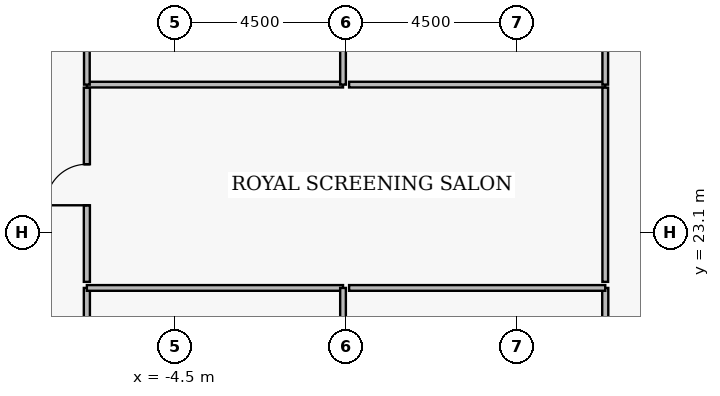
"""IFC4 building model, lengths in metres.
Left out: names, types, materials, properties, quantities, classifications, styles, units other than length and angle.
Written with IfcOpenShell. Run it as: python <this file> out.ifc"""

import sys

from ifc_helpers import new_model, si_unit, direction, frame, frame_2d, origin, place, context, subcontext, project, spatial, rectangle, extrude, element, fill, save


model = new_model("IFC4")
c1 = context("Model", 3, precision=1e-05, world=origin(), true_north=direction((0.0, 1.0)))
c2 = subcontext(c1, "Body", "Model", "MODEL_VIEW")
j1 = project(units=[si_unit("LENGTHUNIT", "METRE"), si_unit("PLANEANGLEUNIT", "RADIAN")], contexts=[c1])
p1 = place(None, origin())
s1 = spatial("IfcSite", under=j1, at=p1, CompositionType="ELEMENT")
p2 = place(p1, origin())
s2 = spatial("IfcBuilding", under=s1, at=p2, CompositionType="ELEMENT")
p3 = place(p2, frame((0.0, 0.0, 265.55)))
s3 = spatial("IfcBuildingStorey", under=s2, at=p3, CompositionType="ELEMENT", Elevation=265.55)
p4 = place(p3, frame((-6.82, 16.7, 0.0), z_axis=(0.0, 0.0, 1.0), x_axis=(0.0, 1.0, 0.0)))
e1 = element("IfcWall", 1, at=p4, inside=s3, PredefinedType="PARTITIONING", context=c2, shape_type="SweptSolid", body=[
    extrude(rectangle(XDim=4.95, YDim=0.16, at=frame_2d((2.475, 0.0))), origin(), (0.0, 0.0, 1.0), 3.48),
])
p5 = place(p4, frame((1.935, 0.0, 0.0)))
e2 = element("IfcOpeningElement", 2, at=p5, cuts=e1, PredefinedType="OPENING", context=c2, shape_type="SweptSolid", body=[
    extrude(rectangle(XDim=1.08, YDim=2.18, at=frame_2d((0.54, 1.09))), frame((0.0, 0.09, 0.0), z_axis=(0.0, -1.0, 0.0), x_axis=(1.0, 0.0, 0.0)), (0.0, 0.0, 1.0), 0.18),
])
p6 = place(p3, frame((6.82, 16.7, 0.0), z_axis=(0.0, 0.0, 1.0), x_axis=(0.0, 1.0, 0.0)))
e3 = element("IfcWall", 3, at=p6, inside=s3, PredefinedType="PARTITIONING", context=c2, shape_type="SweptSolid", body=[
    extrude(rectangle(XDim=4.95, YDim=0.16, at=frame_2d((2.475, 0.0))), origin(), (0.0, 0.0, 1.0), 3.48),
])
p7 = place(p6, frame((1.935, 0.0, 0.0)))
e4 = element("IfcOpeningElement", 4, at=p7, cuts=e3, PredefinedType="OPENING", context=c2, shape_type="SweptSolid", body=[
    extrude(rectangle(XDim=1.08, YDim=2.18, at=frame_2d((0.54, 1.09))), frame((0.0, 0.09, 0.0), z_axis=(0.0, -1.0, 0.0), x_axis=(1.0, 0.0, 0.0)), (0.0, 0.0, 1.0), 0.18),
])
p8 = place(p3, frame((-6.82, 21.81, 0.0), z_axis=(0.0, 0.0, 1.0), x_axis=(0.0, 1.0, 0.0)))
e5 = element("IfcWall", 5, at=p8, inside=s3, PredefinedType="PARTITIONING", context=c2, shape_type="SweptSolid", body=[
    extrude(rectangle(XDim=5.11, YDim=0.16, at=frame_2d((2.555, 0.0))), origin(), (0.0, 0.0, 1.0), 3.48),
])
p9 = place(p8, frame((2.015, 0.0, 0.0)))
e6 = element("IfcOpeningElement", 6, at=p9, cuts=e5, PredefinedType="OPENING", context=c2, shape_type="SweptSolid", body=[
    extrude(rectangle(XDim=1.08, YDim=2.18, at=frame_2d((0.54, 1.09))), frame((0.0, 0.09, 0.0), z_axis=(0.0, -1.0, 0.0), x_axis=(1.0, 0.0, 0.0)), (0.0, 0.0, 1.0), 0.18),
])
p10 = place(p3, frame((-6.82, 27.0, 0.0), z_axis=(0.0, 0.0, 1.0), x_axis=(1.0, 0.0, 0.0)))
e7 = element("IfcWall", 7, at=p10, inside=s3, PredefinedType="PARTITIONING", context=c2, shape_type="SweptSolid", body=[
    extrude(rectangle(XDim=6.74, YDim=0.15, at=frame_2d((3.37, 0.0))), origin(), (0.0, 0.0, 1.0), 3.48),
])
for number, where, z_axis, x_axis in (
    (8, (-6.82, 27.0, 0.0), (0.0, 0.0, 1.0), (0.0, 1.0, 0.0)),
    (9, (-0.08, 27.0, 0.0), (0.0, 0.0, 1.0), (0.0, 1.0, 0.0)),
):
    element("IfcWall", number, at=place(p3, frame(where, z_axis=z_axis, x_axis=x_axis)), inside=s3, PredefinedType="PARTITIONING", context=c2, shape_type="SweptSolid", body=[
        extrude(rectangle(XDim=2.4, YDim=0.15, at=frame_2d((1.2, 0.0))), origin(), (0.0, 0.0, 1.0), 3.48),
    ])
p11 = place(p3, frame((0.08, 27.0, 0.0), z_axis=(0.0, 0.0, 1.0), x_axis=(1.0, 0.0, 0.0)))
e10 = element("IfcWall", 10, at=p11, inside=s3, PredefinedType="PARTITIONING", context=c2, shape_type="SweptSolid", body=[
    extrude(rectangle(XDim=6.74, YDim=0.15, at=frame_2d((3.37, 0.0))), origin(), (0.0, 0.0, 1.0), 3.48),
])
p12 = place(p3, frame((6.82, 27.0, 0.0), z_axis=(0.0, 0.0, 1.0), x_axis=(0.0, 1.0, 0.0)))
e11 = element("IfcWall", 11, at=p12, inside=s3, PredefinedType="PARTITIONING", context=c2, shape_type="SweptSolid", body=[
    extrude(rectangle(XDim=2.4, YDim=0.15, at=frame_2d((1.2, 0.0))), origin(), (0.0, 0.0, 1.0), 3.48),
])
p13 = place(p3, frame((-6.82, 21.65, 0.0), z_axis=(0.0, 0.0, 1.0), x_axis=(1.0, 0.0, 0.0)))
e12 = element("IfcWall", 12, at=p13, inside=s3, PredefinedType="PARTITIONING", context=c2, shape_type="SweptSolid", body=[
    extrude(rectangle(XDim=6.74, YDim=0.15, at=frame_2d((3.37, 0.0))), origin(), (0.0, 0.0, 1.0), 3.076),
])
p14 = place(p3, frame((-0.08, 16.7, 0.0), z_axis=(0.0, 0.0, 1.0), x_axis=(0.0, 1.0, 0.0)))
e13 = element("IfcWall", 13, at=p14, inside=s3, PredefinedType="PARTITIONING", context=c2, shape_type="SweptSolid", body=[
    extrude(rectangle(XDim=4.95, YDim=0.15, at=frame_2d((2.475, 0.0))), origin(), (0.0, 0.0, 1.0), 3.48),
])
p15 = place(p3, frame((0.08, 21.65, 0.0), z_axis=(0.0, 0.0, 1.0), x_axis=(1.0, 0.0, 0.0)))
e14 = element("IfcWall", 14, at=p15, inside=s3, PredefinedType="PARTITIONING", context=c2, shape_type="SweptSolid", body=[
    extrude(rectangle(XDim=6.74, YDim=0.15, at=frame_2d((3.37, 0.0))), origin(), (0.0, 0.0, 1.0), 3.076),
])
p16 = place(p3, frame((6.82, 21.81, 0.0), z_axis=(0.0, 0.0, 1.0), x_axis=(0.0, 1.0, 0.0)))
e15 = element("IfcWall", 15, at=p16, inside=s3, PredefinedType="PARTITIONING", context=c2, shape_type="SweptSolid", body=[
    extrude(rectangle(XDim=5.11, YDim=0.15, at=frame_2d((2.555, 0.0))), origin(), (0.0, 0.0, 1.0), 3.48),
])
p17 = place(p9, origin())
e16 = element("IfcDoor", 16, at=p17, inside=s3, OperationType="SINGLE_SWING_LEFT", PredefinedType="DOOR", context=c2, shape_type="SweptSolid", body=[
    extrude(rectangle(XDim=1.08, YDim=2.18, at=frame_2d((0.54, 1.09))), frame((0.0, 0.025, 0.0), z_axis=(0.0, -1.0, 0.0), x_axis=(1.0, 0.0, 0.0)), (0.0, 0.0, 1.0), 0.05),
])
fill(e6, e16)
save(model, sys.argv[1])
